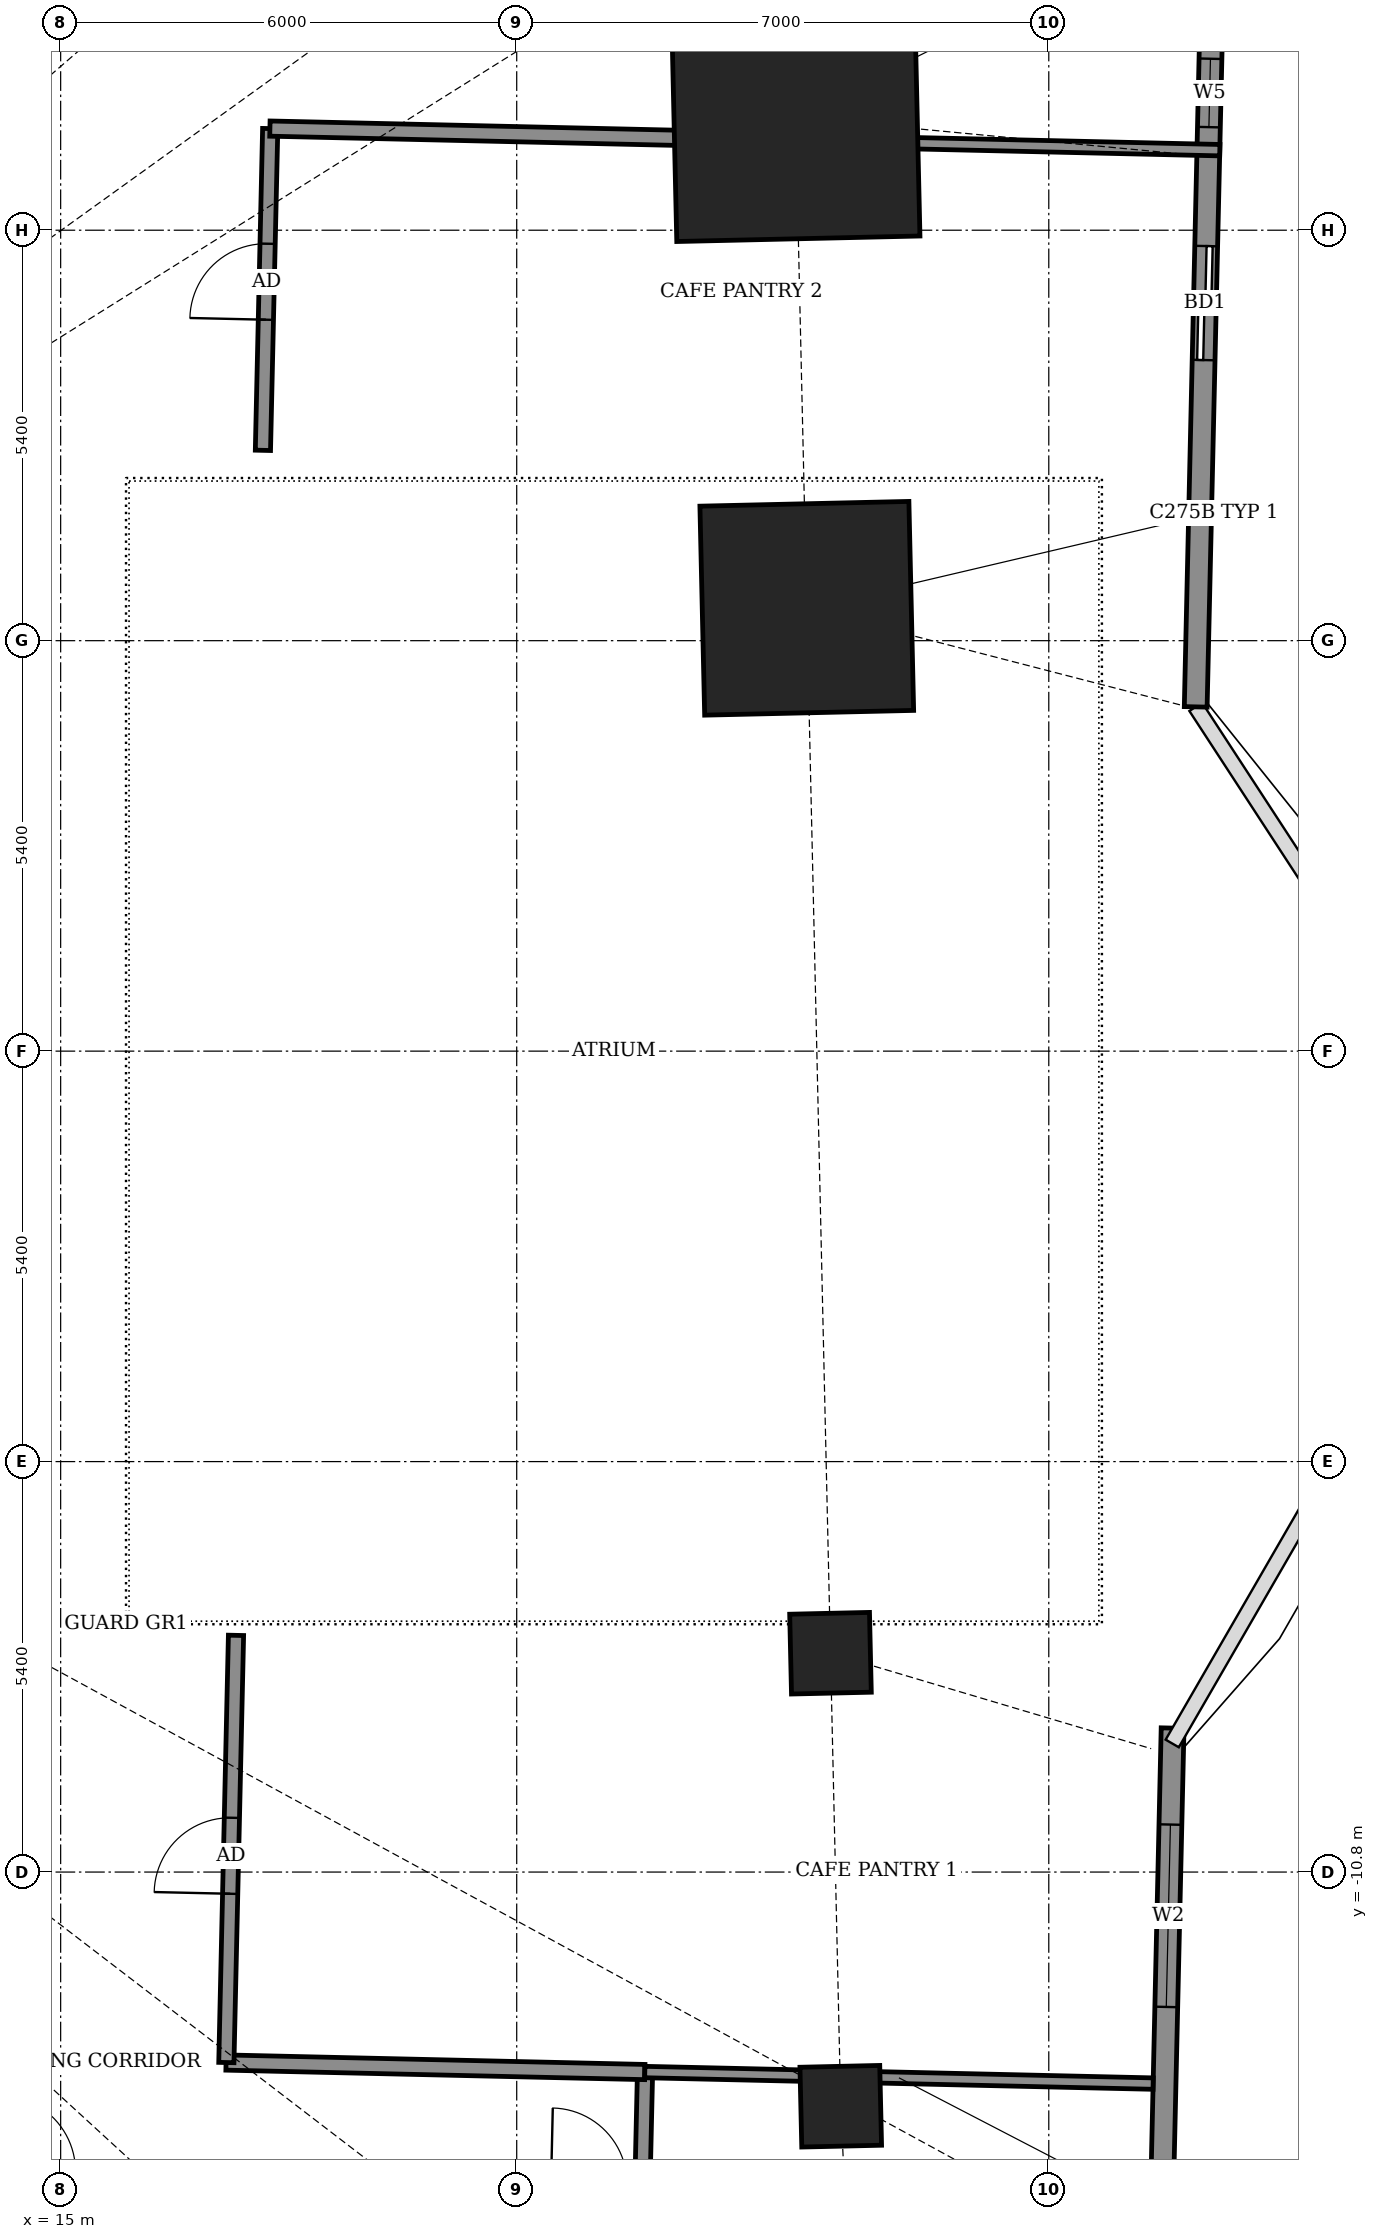
"""IFC4 building model, lengths in metres.
Left out: names, types, materials, properties, quantities, classifications, styles, units other than length and angle.
Written with IfcOpenShell. Run it as: python <this file> out.ifc"""

import sys

from ifc_helpers import new_model, si_unit, direction, frame, frame_2d, origin, origin_2d, place, context, subcontext, project, spatial, rectangle, extrude, element, fill, save


model = new_model("IFC4")
c1 = context("Model", 3, precision=1e-05, world=origin(), true_north=direction((0.0, 1.0)))
c2 = subcontext(c1, "Body", "Model", "MODEL_VIEW")
j1 = project(units=[si_unit("LENGTHUNIT", "METRE"), si_unit("PLANEANGLEUNIT", "RADIAN")], contexts=[c1])
p1 = place(None, origin())
s1 = spatial("IfcSite", under=j1, at=p1, CompositionType="ELEMENT")
p2 = place(p1, origin())
s2 = spatial("IfcBuilding", under=s1, at=p2, CompositionType="ELEMENT")
p3 = place(p2, frame((0.0, 0.0, 252.7)))
s3 = spatial("IfcBuildingStorey", under=s2, at=p3, CompositionType="ELEMENT", Elevation=252.7)
for number, where, z_axis, x_axis in (
    (1, (25.263, -13.881, -0.55), (0.0, 0.0, 1.0), (-0.023, 1.0, 0.0)),
    (2, (25.128, -7.921, -0.55), (0.0, 0.0, 1.0), (-0.023, 1.0, 0.0)),
):
    element("IfcColumn", number, at=place(p3, frame(where, z_axis=z_axis, x_axis=x_axis)), inside=s3, PredefinedType="COLUMN", context=c2, shape_type="SweptSolid", body=[
        extrude(rectangle(XDim=1.05, YDim=1.05, at=origin_2d()), origin(), (0.0, 0.0, 1.0), 4.6),
    ])
p4 = place(p3, frame((24.816, 5.826, -0.55), z_axis=(0.0, 0.0, 1.0), x_axis=(-0.022707923152, 0.999742141868, 0.0)))
e3 = element("IfcColumn", 3, at=p4, inside=s3, PredefinedType="COLUMN", context=c2, shape_type="SweptSolid", body=[
    extrude(rectangle(XDim=2.75, YDim=2.75, at=origin_2d()), origin(), (0.0, 0.0, 1.0), 4.6),
])
p5 = place(p3, frame((24.669, 12.287, -0.55), z_axis=(0.0, 0.0, 1.0), x_axis=(-0.022668680801, 0.999743032439, 0.0)))
e4 = element("IfcColumn", 4, at=p5, inside=s3, PredefinedType="COLUMN", context=c2, shape_type="SweptSolid", body=[
    extrude(rectangle(XDim=3.2, YDim=3.2, at=origin_2d()), origin(), (0.0, 0.0, 1.0), 4.6),
])
p6 = place(p3, frame((29.322, -22.434, 0.0), z_axis=(0.0, 0.0, 1.0), x_axis=(0.022679191715, 0.999742794054, 0.0)))
e5 = element("IfcWall", 5, at=p6, inside=s3, PredefinedType="SOLIDWALL", context=c2, shape_type="SweptSolid", body=[
    extrude(rectangle(XDim=13.531, YDim=0.3, at=frame_2d((6.766, 0.0))), origin(), (0.0, 0.0, 1.0), 2.65),
])
p7 = place(p6, frame((3.6, 0.0, 0.0)))
e6 = element("IfcOpeningElement", 6, at=p7, cuts=e5, PredefinedType="OPENING", context=c2, shape_type="SweptSolid", body=[
    extrude(rectangle(XDim=1.5, YDim=2.4, at=frame_2d((0.75, 1.2))), frame((0.0, 0.16, 0.0), z_axis=(0.0, -1.0, 0.0), x_axis=(1.0, 0.0, 0.0)), (0.0, 0.0, 1.0), 0.32),
])
p8 = place(p6, frame((9.862, 0.0, 0.9)))
e7 = element("IfcOpeningElement", 7, at=p8, cuts=e5, PredefinedType="OPENING", context=c2, shape_type="SweptSolid", body=[
    extrude(rectangle(XDim=2.4, YDim=1.5, at=frame_2d((1.2, 0.75))), frame((0.0, 0.16, 0.0), z_axis=(0.0, -1.0, 0.0), x_axis=(1.0, 0.0, 0.0)), (0.0, 0.0, 1.0), 0.32),
])
p9 = place(p3, frame((29.933, 4.529, 0.0), z_axis=(0.0, 0.0, 1.0), x_axis=(0.022745013272, 0.999741298722, 0.0)))
e8 = element("IfcWall", 8, at=p9, inside=s3, PredefinedType="SOLIDWALL", context=c2, shape_type="SweptSolid", body=[
    extrude(rectangle(XDim=14.33, YDim=0.3, at=frame_2d((7.165, 0.0))), origin(), (0.0, 0.0, 1.0), 2.85),
])
p10 = place(p9, frame((4.564, 0.0, 0.0)))
e9 = element("IfcOpeningElement", 9, at=p10, cuts=e8, PredefinedType="OPENING", context=c2, shape_type="SweptSolid", body=[
    extrude(rectangle(XDim=1.5, YDim=2.4, at=frame_2d((0.75, 1.2))), frame((0.0, 0.16, 0.0), z_axis=(0.0, -1.0, 0.0), x_axis=(1.0, 0.0, 0.0)), (0.0, 0.0, 1.0), 0.32),
])
p11 = place(p9, frame((7.629, 0.0, 0.9)))
e10 = element("IfcOpeningElement", 10, at=p11, cuts=e8, PredefinedType="OPENING", context=c2, shape_type="SweptSolid", body=[
    extrude(rectangle(XDim=0.9, YDim=1.5, at=frame_2d((0.45, 0.75))), frame((0.0, 0.16, 0.0), z_axis=(0.0, -1.0, 0.0), x_axis=(1.0, 0.0, 0.0)), (0.0, 0.0, 1.0), 0.32),
])
p12 = place(p9, frame((10.454, 0.0, 0.9)))
e11 = element("IfcOpeningElement", 11, at=p12, cuts=e8, PredefinedType="OPENING", context=c2, shape_type="SweptSolid", body=[
    extrude(rectangle(XDim=2.4, YDim=1.5, at=frame_2d((1.2, 0.75))), frame((0.0, 0.16, 0.0), z_axis=(0.0, -1.0, 0.0), x_axis=(1.0, 0.0, 0.0)), (0.0, 0.0, 1.0), 0.32),
])
p13 = place(p3, frame((-25.619, -13.836, 0.0), z_axis=(0.0, 0.0, 1.0), x_axis=(0.999742808343, -0.022678561832, 0.0)))
e12 = element("IfcWall", 12, at=p13, inside=s3, PredefinedType="PARTITIONING", context=c2, shape_type="SweptSolid", body=[
    extrude(rectangle(XDim=48.282, YDim=0.2, at=frame_2d((24.141, 0.0))), origin(), (0.0, 0.0, 1.0), 2.45),
])
p14 = place(p13, frame((3.125, 0.0, 0.0)))
e13 = element("IfcOpeningElement", 13, at=p14, cuts=e12, PredefinedType="OPENING", context=c2, shape_type="SweptSolid", body=[
    extrude(rectangle(XDim=1.0, YDim=2.1, at=frame_2d((0.5, 1.05))), frame((0.0, 0.11, 0.0), z_axis=(0.0, -1.0, 0.0), x_axis=(1.0, 0.0, 0.0)), (0.0, 0.0, 1.0), 0.22),
])
p15 = place(p13, frame((9.5, 0.0, 0.0)))
e14 = element("IfcOpeningElement", 14, at=p15, cuts=e12, PredefinedType="OPENING", context=c2, shape_type="SweptSolid", body=[
    extrude(rectangle(XDim=0.9, YDim=2.1, at=frame_2d((0.45, 1.05))), frame((0.0, 0.11, 0.0), z_axis=(0.0, -1.0, 0.0), x_axis=(1.0, 0.0, 0.0)), (0.0, 0.0, 1.0), 0.22),
])
p16 = place(p13, frame((14.5, 0.0, 0.0)))
e15 = element("IfcOpeningElement", 15, at=p16, cuts=e12, PredefinedType="OPENING", context=c2, shape_type="SweptSolid", body=[
    extrude(rectangle(XDim=0.9, YDim=2.1, at=frame_2d((0.45, 1.05))), frame((0.0, 0.11, 0.0), z_axis=(0.0, -1.0, 0.0), x_axis=(1.0, 0.0, 0.0)), (0.0, 0.0, 1.0), 0.22),
])
p17 = place(p13, frame((17.1, 0.0, 0.0)))
e16 = element("IfcOpeningElement", 16, at=p17, cuts=e12, PredefinedType="OPENING", context=c2, shape_type="SweptSolid", body=[
    extrude(rectangle(XDim=0.9, YDim=2.1, at=frame_2d((0.45, 1.05))), frame((0.0, 0.11, 0.0), z_axis=(0.0, -1.0, 0.0), x_axis=(1.0, 0.0, 0.0)), (0.0, 0.0, 1.0), 0.22),
])
p18 = place(p13, frame((24.5, 0.0, 0.0)))
e17 = element("IfcOpeningElement", 17, at=p18, cuts=e12, PredefinedType="OPENING", context=c2, shape_type="SweptSolid", body=[
    extrude(rectangle(XDim=0.9, YDim=2.1, at=frame_2d((0.45, 1.05))), frame((0.0, 0.11, 0.0), z_axis=(0.0, -1.0, 0.0), x_axis=(1.0, 0.0, 0.0)), (0.0, 0.0, 1.0), 0.22),
])
p19 = place(p13, frame((27.1, 0.0, 0.0)))
e18 = element("IfcOpeningElement", 18, at=p19, cuts=e12, PredefinedType="OPENING", context=c2, shape_type="SweptSolid", body=[
    extrude(rectangle(XDim=0.9, YDim=2.1, at=frame_2d((0.45, 1.05))), frame((0.0, 0.11, 0.0), z_axis=(0.0, -1.0, 0.0), x_axis=(1.0, 0.0, 0.0)), (0.0, 0.0, 1.0), 0.22),
])
p20 = place(p13, frame((35.825, 0.0, 0.0)))
e19 = element("IfcOpeningElement", 19, at=p20, cuts=e12, PredefinedType="OPENING", context=c2, shape_type="SweptSolid", body=[
    extrude(rectangle(XDim=1.0, YDim=2.1, at=frame_2d((0.5, 1.05))), frame((0.0, 0.11, 0.0), z_axis=(0.0, -1.0, 0.0), x_axis=(1.0, 0.0, 0.0)), (0.0, 0.0, 1.0), 0.22),
])
p21 = place(p13, frame((32.1, 0.0, 0.0)))
e20 = element("IfcOpeningElement", 20, at=p21, cuts=e12, PredefinedType="OPENING", context=c2, shape_type="SweptSolid", body=[
    extrude(rectangle(XDim=0.9, YDim=2.1, at=frame_2d((0.45, 1.05))), frame((0.0, 0.11, 0.0), z_axis=(0.0, -1.0, 0.0), x_axis=(1.0, 0.0, 0.0)), (0.0, 0.0, 1.0), 0.22),
])
p22 = place(p13, frame((39.825, 0.0, 0.0)))
e21 = element("IfcOpeningElement", 21, at=p22, cuts=e12, PredefinedType="OPENING", context=c2, shape_type="SweptSolid", body=[
    extrude(rectangle(XDim=1.0, YDim=2.1, at=frame_2d((0.5, 1.05))), frame((0.0, 0.11, 0.0), z_axis=(0.0, -1.0, 0.0), x_axis=(1.0, 0.0, 0.0)), (0.0, 0.0, 1.0), 0.22),
])
p23 = place(p13, frame((47.083, 0.0, 0.0)))
e22 = element("IfcOpeningElement", 22, at=p23, cuts=e12, PredefinedType="OPENING", context=c2, shape_type="SweptSolid", body=[
    extrude(rectangle(XDim=1.0, YDim=2.1, at=frame_2d((0.5, 1.05))), frame((0.0, 0.11, 0.0), z_axis=(0.0, -1.0, 0.0), x_axis=(1.0, 0.0, 0.0)), (0.0, 0.0, 1.0), 0.22),
])
p24 = place(p3, frame((22.654, -14.931, 0.0), z_axis=(0.0, 0.0, 1.0), x_axis=(0.022617910375, 0.999744182344, 0.0)))
e23 = element("IfcWall", 23, at=p24, inside=s3, PredefinedType="PARTITIONING", context=c2, shape_type="SweptSolid", body=[
    extrude(rectangle(XDim=1.5, YDim=0.2, at=frame_2d((0.75, 0.0))), origin(), (0.0, 0.0, 1.0), 4.05),
])
p25 = place(p3, frame((17.176, -13.306, 0.0), z_axis=(0.0, 0.0, 1.0), x_axis=(0.999742681153, -0.022684168081, 0.0)))
e24 = element("IfcWall", 24, at=p25, inside=s3, PredefinedType="PARTITIONING", context=c2, shape_type="SweptSolid", body=[
    extrude(rectangle(XDim=5.51, YDim=0.2, at=frame_2d((2.755, 0.0))), origin(), (0.0, 0.0, 1.0), 2.65),
])
p26 = place(p3, frame((17.18, -13.306, 0.0), z_axis=(0.0, 0.0, 1.0), x_axis=(0.022584272568, 0.999744942789, 0.0)))
e25 = element("IfcWall", 25, at=p26, inside=s3, PredefinedType="PARTITIONING", context=c2, shape_type="SweptSolid", body=[
    extrude(rectangle(XDim=5.621, YDim=0.2, at=frame_2d((2.811, 0.0))), origin(), (0.0, 0.0, 1.0), 2.65),
])
p27 = place(p26, frame((2.221, 0.0, 0.0)))
e26 = element("IfcOpeningElement", 26, at=p27, cuts=e25, PredefinedType="OPENING", context=c2, shape_type="SweptSolid", body=[
    extrude(rectangle(XDim=1.0, YDim=2.1, at=frame_2d((0.5, 1.05))), frame((0.0, 0.11, 0.0), z_axis=(0.0, -1.0, 0.0), x_axis=(1.0, 0.0, 0.0)), (0.0, 0.0, 1.0), 0.22),
])
p28 = place(p3, frame((22.685, -13.431, 0.0), z_axis=(0.0, 0.0, 1.0), x_axis=(0.999741496297, -0.022736327378, 0.0)))
e27 = element("IfcWall", 27, at=p28, inside=s3, PredefinedType="PARTITIONING", context=c2, shape_type="SweptSolid", body=[
    extrude(rectangle(XDim=6.69, YDim=0.15, at=frame_2d((3.345, 0.0))), origin(), (0.0, 0.0, 1.0), 2.75),
])
p29 = place(p3, frame((17.661, 7.904, 0.0), z_axis=(0.0, 0.0, 1.0), x_axis=(0.022718785711, 0.999741895079, 0.0)))
e28 = element("IfcWall", 28, at=p29, inside=s3, PredefinedType="PARTITIONING", context=c2, shape_type="SweptSolid", body=[
    extrude(rectangle(XDim=4.234, YDim=0.2, at=frame_2d((2.117, 0.0))), origin(), (0.0, 0.0, 1.0), 2.85),
])
p30 = place(p29, frame((1.719, 0.0, 0.0)))
e29 = element("IfcOpeningElement", 29, at=p30, cuts=e28, PredefinedType="OPENING", context=c2, shape_type="SweptSolid", body=[
    extrude(rectangle(XDim=1.0, YDim=2.1, at=frame_2d((0.5, 1.05))), frame((0.0, 0.11, 0.0), z_axis=(0.0, -1.0, 0.0), x_axis=(1.0, 0.0, 0.0)), (0.0, 0.0, 1.0), 0.22),
])
p31 = place(p3, frame((17.753, 12.137, 0.0), z_axis=(0.0, 0.0, 1.0), x_axis=(0.999742772321, -0.022680149738, 0.0)))
e30 = element("IfcWall", 30, at=p31, inside=s3, PredefinedType="PARTITIONING", context=c2, shape_type="SweptSolid", body=[
    extrude(rectangle(XDim=5.511, YDim=0.2, at=frame_2d((2.756, 0.0))), origin(), (0.0, 0.0, 1.0), 2.85),
])
p32 = place(p3, frame((23.263, 12.012, 0.0), z_axis=(0.0, 0.0, 1.0), x_axis=(0.999741384486, -0.022741243275, 0.0)))
e31 = element("IfcWall", 31, at=p32, inside=s3, PredefinedType="PARTITIONING", context=c2, shape_type="SweptSolid", body=[
    extrude(rectangle(XDim=6.989, YDim=0.15, at=frame_2d((3.494, 0.0))), origin(), (0.0, 0.0, 1.0), 2.85),
])
p33 = place(p3, frame((23.266, 12.012, 0.0), z_axis=(0.0, 0.0, 1.0), x_axis=(0.022617910375, 0.999744182344, 0.0)))
e32 = element("IfcWall", 32, at=p33, inside=s3, PredefinedType="PARTITIONING", context=c2, shape_type="SweptSolid", body=[
    extrude(rectangle(XDim=1.5, YDim=0.2, at=frame_2d((0.75, 0.0))), origin(), (0.0, 0.0, 1.0), 4.05),
])
p34 = place(p8, origin())
e33 = element("IfcWindow", 33, at=p34, inside=s3, PartitioningType="DOUBLE_PANEL_VERTICAL", PredefinedType="WINDOW", context=c2, shape_type="SweptSolid", body=[
    extrude(rectangle(XDim=2.4, YDim=1.5, at=frame_2d((1.2, 0.75))), frame((0.0, 0.03, 0.0), z_axis=(0.0, -1.0, 0.0), x_axis=(1.0, 0.0, 0.0)), (0.0, 0.0, 1.0), 0.06),
])
fill(e7, e33)
p35 = place(p10, origin())
e34 = element("IfcDoor", 34, at=p35, inside=s3, OperationType="SLIDING_TO_LEFT", PredefinedType="DOOR", context=c2, shape_type="SweptSolid", body=[
    extrude(rectangle(XDim=1.5, YDim=2.4, at=frame_2d((0.75, 1.2))), frame((0.0, 0.025, 0.0), z_axis=(0.0, -1.0, 0.0), x_axis=(1.0, 0.0, 0.0)), (0.0, 0.0, 1.0), 0.05),
])
fill(e9, e34)
p36 = place(p11, origin())
e35 = element("IfcWindow", 35, at=p36, inside=s3, PartitioningType="SINGLE_PANEL", PredefinedType="WINDOW", context=c2, shape_type="SweptSolid", body=[
    extrude(rectangle(XDim=0.9, YDim=1.5, at=frame_2d((0.45, 0.75))), frame((0.0, 0.03, 0.0), z_axis=(0.0, -1.0, 0.0), x_axis=(1.0, 0.0, 0.0)), (0.0, 0.0, 1.0), 0.06),
])
fill(e10, e35)
p37 = place(p27, origin())
e36 = element("IfcDoor", 36, at=p37, inside=s3, OperationType="SINGLE_SWING_LEFT", PredefinedType="DOOR", context=c2, shape_type="SweptSolid", body=[
    extrude(rectangle(XDim=1.0, YDim=2.1, at=frame_2d((0.5, 1.05))), frame((0.0, 0.025, 0.0), z_axis=(0.0, -1.0, 0.0), x_axis=(1.0, 0.0, 0.0)), (0.0, 0.0, 1.0), 0.05),
])
fill(e26, e36)
p38 = place(p30, origin())
e37 = element("IfcDoor", 37, at=p38, inside=s3, OperationType="SINGLE_SWING_RIGHT", PredefinedType="DOOR", context=c2, shape_type="SweptSolid", body=[
    extrude(rectangle(XDim=1.0, YDim=2.1, at=frame_2d((0.5, 1.05))), frame((0.0, 0.025, 0.0), z_axis=(0.0, -1.0, 0.0), x_axis=(1.0, 0.0, 0.0)), (0.0, 0.0, 1.0), 0.05),
])
fill(e29, e37)
save(model, sys.argv[1])
